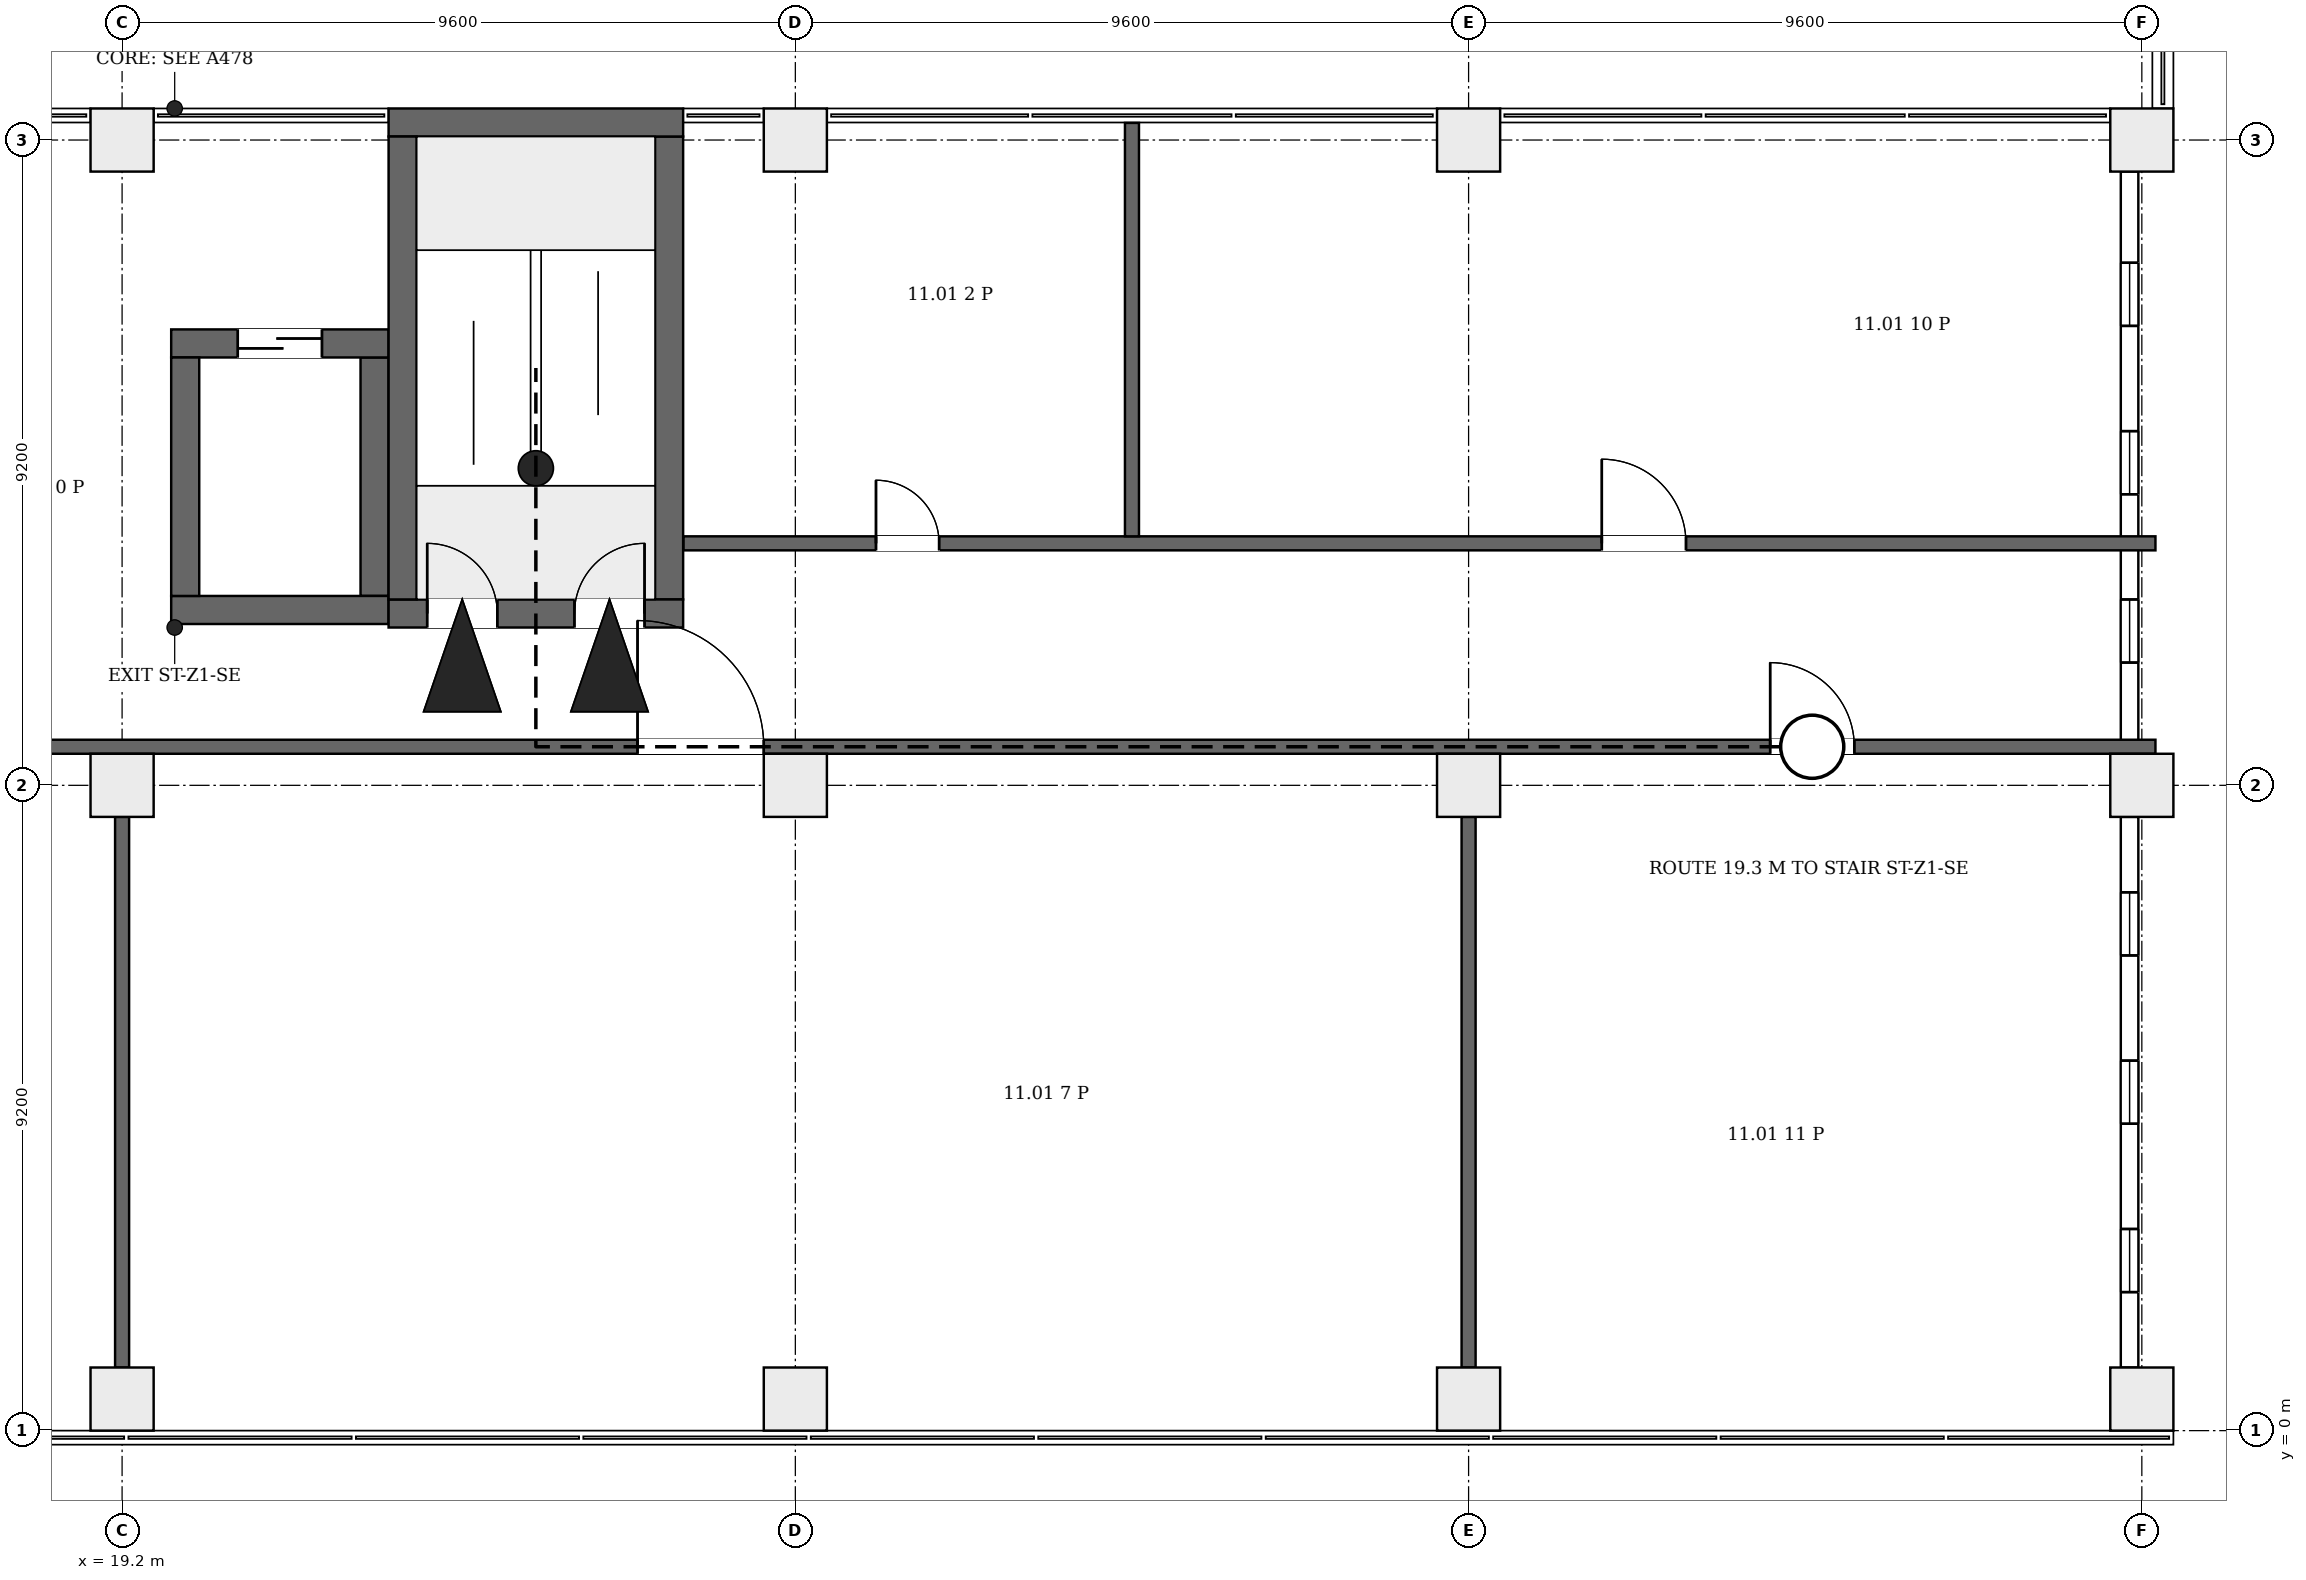
"""IFC4 building model, lengths in metres.
Left out: names, types, materials, properties, quantities, classifications, styles, units other than length and angle.
Written with IfcOpenShell. Run it as: python <this file> out.ifc"""

import sys

from ifc_helpers import new_model, si_unit, direction, frame, frame_2d, origin, origin_2d, place, context, subcontext, project, spatial, rectangle, extrude, element, fill, save


model = new_model("IFC4")
c1 = context("Model", 3, precision=1e-05, world=origin(), true_north=direction((0.0, 1.0)))
c2 = subcontext(c1, "Body", "Model", "MODEL_VIEW")
j1 = project(units=[si_unit("LENGTHUNIT", "METRE"), si_unit("PLANEANGLEUNIT", "RADIAN")], contexts=[c1])
p1 = place(None, origin())
s1 = spatial("IfcSite", under=j1, at=p1, CompositionType="ELEMENT")
p2 = place(p1, origin())
s2 = spatial("IfcBuilding", under=s1, at=p2, CompositionType="ELEMENT")
p3 = place(p2, frame((0.0, 0.0, 57.1)))
s3 = spatial("IfcBuildingStorey", under=s2, at=p3, CompositionType="ELEMENT", Elevation=57.1)
p4 = place(p3, frame((23.0, 11.65, 0.0), z_axis=(0.0, 0.0, 1.0), x_axis=(1.0, 0.0, 0.0)))
e1 = element("IfcWall", 1, at=p4, inside=s3, PredefinedType="SHEAR", context=c2, shape_type="SweptSolid", body=[
    extrude(rectangle(XDim=4.2, YDim=0.4, at=frame_2d((2.1, 0.0))), origin(), (0.0, 0.0, 1.0), 4.2),
])
p5 = place(p4, frame((0.55, 0.0, 0.0)))
e2 = element("IfcOpeningElement", 2, at=p5, cuts=e1, PredefinedType="OPENING", context=c2, shape_type="SweptSolid", body=[
    extrude(rectangle(XDim=1.0, YDim=2.1, at=frame_2d((0.5, 1.05))), frame((0.0, 0.21, 0.0), z_axis=(0.0, -1.0, 0.0), x_axis=(1.0, 0.0, 0.0)), (0.0, 0.0, 1.0), 0.42),
])
p6 = place(p4, frame((2.65, 0.0, 0.0)))
e3 = element("IfcOpeningElement", 3, at=p6, cuts=e1, PredefinedType="OPENING", context=c2, shape_type="SweptSolid", body=[
    extrude(rectangle(XDim=1.0, YDim=2.1, at=frame_2d((0.5, 1.05))), frame((0.0, 0.21, 0.0), z_axis=(0.0, -1.0, 0.0), x_axis=(1.0, 0.0, 0.0)), (0.0, 0.0, 1.0), 0.42),
])
p7 = place(p3, frame((23.0, 18.65, 0.0), z_axis=(0.0, 0.0, 1.0), x_axis=(1.0, 0.0, 0.0)))
e4 = element("IfcWall", 4, at=p7, inside=s3, PredefinedType="SHEAR", context=c2, shape_type="SweptSolid", body=[
    extrude(rectangle(XDim=4.2, YDim=0.4, at=frame_2d((2.1, 0.0))), origin(), (0.0, 0.0, 1.0), 4.2),
])
for number, where, z_axis, x_axis in (
    (5, (23.2, 11.85, 0.0), (0.0, 0.0, 1.0), (0.0, 1.0, 0.0)),
    (6, (27.0, 11.85, 0.0), (0.0, 0.0, 1.0), (0.0, 1.0, 0.0)),
):
    element("IfcWall", number, at=place(p3, frame(where, z_axis=z_axis, x_axis=x_axis)), inside=s3, PredefinedType="SHEAR", context=c2, shape_type="SweptSolid", body=[
        extrude(rectangle(XDim=6.6, YDim=0.4, at=frame_2d((3.3, 0.0))), origin(), (0.0, 0.0, 1.0), 4.2),
    ])
p8 = place(p3, frame((19.9, 11.7, 0.0), z_axis=(0.0, 0.0, 1.0), x_axis=(1.0, 0.0, 0.0)))
e7 = element("IfcWall", 7, at=p8, inside=s3, PredefinedType="SHEAR", context=c2, shape_type="SweptSolid", body=[
    extrude(rectangle(XDim=3.1, YDim=0.4, at=frame_2d((1.55, 0.0))), origin(), (0.0, 0.0, 1.0), 4.2),
])
p9 = place(p3, frame((19.9, 15.5, 0.0), z_axis=(0.0, 0.0, 1.0), x_axis=(1.0, 0.0, 0.0)))
e8 = element("IfcWall", 8, at=p9, inside=s3, PredefinedType="SHEAR", context=c2, shape_type="SweptSolid", body=[
    extrude(rectangle(XDim=3.1, YDim=0.4, at=frame_2d((1.55, 0.0))), origin(), (0.0, 0.0, 1.0), 4.2),
])
p10 = place(p9, frame((0.95, 0.0, 0.0)))
e9 = element("IfcOpeningElement", 9, at=p10, cuts=e8, PredefinedType="OPENING", context=c2, shape_type="SweptSolid", body=[
    extrude(rectangle(XDim=1.2, YDim=2.1, at=frame_2d((0.6, 1.05))), frame((0.0, 0.21, 0.0), z_axis=(0.0, -1.0, 0.0), x_axis=(1.0, 0.0, 0.0)), (0.0, 0.0, 1.0), 0.42),
])
for number, where, z_axis, x_axis in (
    (10, (20.1, 11.9, 0.0), (0.0, 0.0, 1.0), (0.0, 1.0, 0.0)),
    (11, (22.8, 11.9, 0.0), (0.0, 0.0, 1.0), (0.0, 1.0, 0.0)),
):
    element("IfcWall", number, at=place(p3, frame(where, z_axis=z_axis, x_axis=x_axis)), inside=s3, PredefinedType="SHEAR", context=c2, shape_type="SweptSolid", body=[
        extrude(rectangle(XDim=3.4, YDim=0.4, at=frame_2d((1.7, 0.0))), origin(), (0.0, 0.0, 1.0), 4.2),
    ])
for number, where, z_axis, x_axis in (
    (12, (19.2, 0.45, 0.0), (0.0, 0.0, 1.0), (1.0, 0.0, 0.0)),
    (13, (28.8, 0.45, 0.0), (0.0, 0.0, 1.0), (1.0, 0.0, 0.0)),
    (14, (38.4, 0.45, 0.0), (0.0, 0.0, 1.0), (1.0, 0.0, 0.0)),
    (15, (48.0, 0.45, 0.0), (0.0, 0.0, 1.0), (1.0, 0.0, 0.0)),
    (16, (19.2, 9.2, 0.0), (0.0, 0.0, 1.0), (1.0, 0.0, 0.0)),
    (17, (28.8, 9.2, 0.0), (0.0, 0.0, 1.0), (1.0, 0.0, 0.0)),
    (18, (38.4, 9.2, 0.0), (0.0, 0.0, 1.0), (1.0, 0.0, 0.0)),
    (19, (48.0, 9.2, 0.0), (0.0, 0.0, 1.0), (1.0, 0.0, 0.0)),
    (20, (19.2, 18.4, 0.0), (0.0, 0.0, 1.0), (1.0, 0.0, 0.0)),
    (21, (28.8, 18.4, 0.0), (0.0, 0.0, 1.0), (1.0, 0.0, 0.0)),
    (22, (38.4, 18.4, 0.0), (0.0, 0.0, 1.0), (1.0, 0.0, 0.0)),
    (23, (48.0, 18.4, 0.0), (0.0, 0.0, 1.0), (1.0, 0.0, 0.0)),
):
    element("IfcColumn", number, at=place(p3, frame(where, z_axis=z_axis, x_axis=x_axis)), inside=s3, PredefinedType="COLUMN", context=c2, shape_type="SweptSolid", body=[
        extrude(rectangle(XDim=0.9, YDim=0.9, at=origin_2d()), origin(), (0.0, 0.0, 1.0), 4.2),
    ])
p11 = place(p3, frame((47.825, 0.9, 0.0), z_axis=(0.0, 0.0, 1.0), x_axis=(0.0, 1.0, 0.0)))
e24 = element("IfcWall", 24, at=p11, inside=s3, PredefinedType="ELEMENTEDWALL", context=c2, shape_type="SweptSolid", body=[
    extrude(rectangle(XDim=7.85, YDim=0.25, at=frame_2d((3.925, 0.0))), origin(), (0.0, 0.0, 1.0), 3.3),
])
p12 = place(p11, frame((1.075, 0.0, 0.6)))
e25 = element("IfcOpeningElement", 25, at=p12, cuts=e24, PredefinedType="OPENING", context=c2, shape_type="SweptSolid", body=[
    extrude(rectangle(XDim=0.9, YDim=2.6, at=frame_2d((0.45, 1.3))), frame((0.0, 0.135, 0.0), z_axis=(0.0, -1.0, 0.0), x_axis=(1.0, 0.0, 0.0)), (0.0, 0.0, 1.0), 0.27),
])
p13 = place(p11, frame((3.475, 0.0, 0.6)))
e26 = element("IfcOpeningElement", 26, at=p13, cuts=e24, PredefinedType="OPENING", context=c2, shape_type="SweptSolid", body=[
    extrude(rectangle(XDim=0.9, YDim=2.6, at=frame_2d((0.45, 1.3))), frame((0.0, 0.135, 0.0), z_axis=(0.0, -1.0, 0.0), x_axis=(1.0, 0.0, 0.0)), (0.0, 0.0, 1.0), 0.27),
])
p14 = place(p11, frame((5.875, 0.0, 0.6)))
e27 = element("IfcOpeningElement", 27, at=p14, cuts=e24, PredefinedType="OPENING", context=c2, shape_type="SweptSolid", body=[
    extrude(rectangle(XDim=0.9, YDim=2.6, at=frame_2d((0.45, 1.3))), frame((0.0, 0.135, 0.0), z_axis=(0.0, -1.0, 0.0), x_axis=(1.0, 0.0, 0.0)), (0.0, 0.0, 1.0), 0.27),
])
p15 = place(p3, frame((47.825, 9.65, 0.0), z_axis=(0.0, 0.0, 1.0), x_axis=(0.0, 1.0, 0.0)))
e28 = element("IfcWall", 28, at=p15, inside=s3, PredefinedType="ELEMENTEDWALL", context=c2, shape_type="SweptSolid", body=[
    extrude(rectangle(XDim=8.3, YDim=0.25, at=frame_2d((4.15, 0.0))), origin(), (0.0, 0.0, 1.0), 3.3),
])
p16 = place(p15, frame((1.3, 0.0, 0.6)))
e29 = element("IfcOpeningElement", 29, at=p16, cuts=e28, PredefinedType="OPENING", context=c2, shape_type="SweptSolid", body=[
    extrude(rectangle(XDim=0.9, YDim=2.6, at=frame_2d((0.45, 1.3))), frame((0.0, 0.135, 0.0), z_axis=(0.0, -1.0, 0.0), x_axis=(1.0, 0.0, 0.0)), (0.0, 0.0, 1.0), 0.27),
])
p17 = place(p15, frame((3.7, 0.0, 0.6)))
e30 = element("IfcOpeningElement", 30, at=p17, cuts=e28, PredefinedType="OPENING", context=c2, shape_type="SweptSolid", body=[
    extrude(rectangle(XDim=0.9, YDim=2.6, at=frame_2d((0.45, 1.3))), frame((0.0, 0.135, 0.0), z_axis=(0.0, -1.0, 0.0), x_axis=(1.0, 0.0, 0.0)), (0.0, 0.0, 1.0), 0.27),
])
p18 = place(p15, frame((6.1, 0.0, 0.6)))
e31 = element("IfcOpeningElement", 31, at=p18, cuts=e28, PredefinedType="OPENING", context=c2, shape_type="SweptSolid", body=[
    extrude(rectangle(XDim=0.9, YDim=2.6, at=frame_2d((0.45, 1.3))), frame((0.0, 0.135, 0.0), z_axis=(0.0, -1.0, 0.0), x_axis=(1.0, 0.0, 0.0)), (0.0, 0.0, 1.0), 0.27),
])
p19 = place(p3, frame((4.3, 9.75, 0.0), z_axis=(0.0, 0.0, 1.0), x_axis=(1.0, 0.0, 0.0)))
e32 = element("IfcWall", 32, at=p19, inside=s3, PredefinedType="PARTITIONING", context=c2, shape_type="SweptSolid", body=[
    extrude(rectangle(XDim=43.894, YDim=0.2, at=frame_2d((21.947, 0.0))), origin(), (0.0, 0.0, 1.0), 3.9),
])
p20 = place(p19, frame((6.6, 0.0, 0.0)))
e33 = element("IfcOpeningElement", 33, at=p20, cuts=e32, PredefinedType="OPENING", context=c2, shape_type="SweptSolid", body=[
    extrude(rectangle(XDim=1.8, YDim=2.1, at=frame_2d((0.9, 1.05))), frame((0.0, 0.11, 0.0), z_axis=(0.0, -1.0, 0.0), x_axis=(1.0, 0.0, 0.0)), (0.0, 0.0, 1.0), 0.22),
])
p21 = place(p19, frame((22.25, 0.0, 0.0)))
e34 = element("IfcOpeningElement", 34, at=p21, cuts=e32, PredefinedType="OPENING", context=c2, shape_type="SweptSolid", body=[
    extrude(rectangle(XDim=1.8, YDim=2.1, at=frame_2d((0.9, 1.05))), frame((0.0, 0.11, 0.0), z_axis=(0.0, -1.0, 0.0), x_axis=(1.0, 0.0, 0.0)), (0.0, 0.0, 1.0), 0.22),
])
p22 = place(p19, frame((38.4, 0.0, 0.0)))
e35 = element("IfcOpeningElement", 35, at=p22, cuts=e32, PredefinedType="OPENING", context=c2, shape_type="SweptSolid", body=[
    extrude(rectangle(XDim=1.2, YDim=2.1, at=frame_2d((0.6, 1.05))), frame((0.0, 0.11, 0.0), z_axis=(0.0, -1.0, 0.0), x_axis=(1.0, 0.0, 0.0)), (0.0, 0.0, 1.0), 0.22),
])
p23 = place(p3, frame((19.2, 0.9, 0.0), z_axis=(0.0, 0.0, 1.0), x_axis=(0.0, 1.0, 0.0)))
e36 = element("IfcWall", 36, at=p23, inside=s3, PredefinedType="PARTITIONING", context=c2, shape_type="SweptSolid", body=[
    extrude(rectangle(XDim=7.85, YDim=0.2, at=frame_2d((3.925, 0.0))), origin(), (0.0, 0.0, 1.0), 3.9),
])
p24 = place(p3, frame((27.206, 12.65, 0.0), z_axis=(0.0, 0.0, 1.0), x_axis=(1.0, 0.0, 0.0)))
e37 = element("IfcWall", 37, at=p24, inside=s3, PredefinedType="PARTITIONING", context=c2, shape_type="SweptSolid", body=[
    extrude(rectangle(XDim=20.988, YDim=0.2, at=frame_2d((10.494, 0.0))), origin(), (0.0, 0.0, 1.0), 3.9),
])
p25 = place(p24, frame((2.744, 0.0, 0.0)))
e38 = element("IfcOpeningElement", 38, at=p25, cuts=e37, PredefinedType="OPENING", context=c2, shape_type="SweptSolid", body=[
    extrude(rectangle(XDim=0.9, YDim=2.1, at=frame_2d((0.45, 1.05))), frame((0.0, 0.11, 0.0), z_axis=(0.0, -1.0, 0.0), x_axis=(1.0, 0.0, 0.0)), (0.0, 0.0, 1.0), 0.22),
])
p26 = place(p24, frame((13.094, 0.0, 0.0)))
e39 = element("IfcOpeningElement", 39, at=p26, cuts=e37, PredefinedType="OPENING", context=c2, shape_type="SweptSolid", body=[
    extrude(rectangle(XDim=1.2, YDim=2.1, at=frame_2d((0.6, 1.05))), frame((0.0, 0.11, 0.0), z_axis=(0.0, -1.0, 0.0), x_axis=(1.0, 0.0, 0.0)), (0.0, 0.0, 1.0), 0.22),
])
p27 = place(p3, frame((33.6, 12.75, 0.0), z_axis=(0.0, 0.0, 1.0), x_axis=(0.0, 1.0, 0.0)))
e40 = element("IfcWall", 40, at=p27, inside=s3, PredefinedType="PARTITIONING", context=c2, shape_type="SweptSolid", body=[
    extrude(rectangle(XDim=5.894, YDim=0.2, at=frame_2d((2.947, 0.0))), origin(), (0.0, 0.0, 1.0), 3.9),
])
p28 = place(p3, frame((38.4, 0.9, 0.0), z_axis=(0.0, 0.0, 1.0), x_axis=(0.0, 1.0, 0.0)))
e41 = element("IfcWall", 41, at=p28, inside=s3, PredefinedType="PARTITIONING", context=c2, shape_type="SweptSolid", body=[
    extrude(rectangle(XDim=7.85, YDim=0.2, at=frame_2d((3.925, 0.0))), origin(), (0.0, 0.0, 1.0), 3.9),
])
p29 = place(p12, origin())
e42 = element("IfcWindow", 42, at=p29, inside=s3, PartitioningType="SINGLE_PANEL", PredefinedType="WINDOW", context=c2, shape_type="SweptSolid", body=[
    extrude(rectangle(XDim=0.9, YDim=2.6, at=frame_2d((0.45, 1.3))), frame((0.0, 0.03, 0.0), z_axis=(0.0, -1.0, 0.0), x_axis=(1.0, 0.0, 0.0)), (0.0, 0.0, 1.0), 0.06),
])
fill(e25, e42)
p30 = place(p13, origin())
e43 = element("IfcWindow", 43, at=p30, inside=s3, PartitioningType="SINGLE_PANEL", PredefinedType="WINDOW", context=c2, shape_type="SweptSolid", body=[
    extrude(rectangle(XDim=0.9, YDim=2.6, at=frame_2d((0.45, 1.3))), frame((0.0, 0.03, 0.0), z_axis=(0.0, -1.0, 0.0), x_axis=(1.0, 0.0, 0.0)), (0.0, 0.0, 1.0), 0.06),
])
fill(e26, e43)
p31 = place(p14, origin())
e44 = element("IfcWindow", 44, at=p31, inside=s3, PartitioningType="SINGLE_PANEL", PredefinedType="WINDOW", context=c2, shape_type="SweptSolid", body=[
    extrude(rectangle(XDim=0.9, YDim=2.6, at=frame_2d((0.45, 1.3))), frame((0.0, 0.03, 0.0), z_axis=(0.0, -1.0, 0.0), x_axis=(1.0, 0.0, 0.0)), (0.0, 0.0, 1.0), 0.06),
])
fill(e27, e44)
p32 = place(p16, origin())
e45 = element("IfcWindow", 45, at=p32, inside=s3, PartitioningType="SINGLE_PANEL", PredefinedType="WINDOW", context=c2, shape_type="SweptSolid", body=[
    extrude(rectangle(XDim=0.9, YDim=2.6, at=frame_2d((0.45, 1.3))), frame((0.0, 0.03, 0.0), z_axis=(0.0, -1.0, 0.0), x_axis=(1.0, 0.0, 0.0)), (0.0, 0.0, 1.0), 0.06),
])
fill(e29, e45)
p33 = place(p17, origin())
e46 = element("IfcWindow", 46, at=p33, inside=s3, PartitioningType="SINGLE_PANEL", PredefinedType="WINDOW", context=c2, shape_type="SweptSolid", body=[
    extrude(rectangle(XDim=0.9, YDim=2.6, at=frame_2d((0.45, 1.3))), frame((0.0, 0.03, 0.0), z_axis=(0.0, -1.0, 0.0), x_axis=(1.0, 0.0, 0.0)), (0.0, 0.0, 1.0), 0.06),
])
fill(e30, e46)
p34 = place(p18, origin())
e47 = element("IfcWindow", 47, at=p34, inside=s3, PartitioningType="SINGLE_PANEL", PredefinedType="WINDOW", context=c2, shape_type="SweptSolid", body=[
    extrude(rectangle(XDim=0.9, YDim=2.6, at=frame_2d((0.45, 1.3))), frame((0.0, 0.03, 0.0), z_axis=(0.0, -1.0, 0.0), x_axis=(1.0, 0.0, 0.0)), (0.0, 0.0, 1.0), 0.06),
])
fill(e31, e47)
p35 = place(p5, origin())
e48 = element("IfcDoor", 48, at=p35, inside=s3, OperationType="SINGLE_SWING_RIGHT", PredefinedType="DOOR", context=c2, shape_type="SweptSolid", body=[
    extrude(rectangle(XDim=1.0, YDim=2.1, at=frame_2d((0.5, 1.05))), frame((0.0, 0.025, 0.0), z_axis=(0.0, -1.0, 0.0), x_axis=(1.0, 0.0, 0.0)), (0.0, 0.0, 1.0), 0.05),
])
fill(e2, e48)
p36 = place(p6, origin())
e49 = element("IfcDoor", 49, at=p36, inside=s3, OperationType="SINGLE_SWING_LEFT", PredefinedType="DOOR", context=c2, shape_type="SweptSolid", body=[
    extrude(rectangle(XDim=1.0, YDim=2.1, at=frame_2d((0.5, 1.05))), frame((0.0, 0.025, 0.0), z_axis=(0.0, -1.0, 0.0), x_axis=(1.0, 0.0, 0.0)), (0.0, 0.0, 1.0), 0.05),
])
fill(e3, e49)
p37 = place(p10, origin())
e50 = element("IfcDoor", 50, at=p37, inside=s3, OperationType="DOUBLE_DOOR_SLIDING", PredefinedType="DOOR", context=c2, shape_type="SweptSolid", body=[
    extrude(rectangle(XDim=1.2, YDim=2.1, at=frame_2d((0.6, 1.05))), frame((0.0, 0.025, 0.0), z_axis=(0.0, -1.0, 0.0), x_axis=(1.0, 0.0, 0.0)), (0.0, 0.0, 1.0), 0.05),
])
fill(e9, e50)
p38 = place(p21, origin())
e51 = element("IfcDoor", 51, at=p38, inside=s3, OperationType="DOUBLE_DOOR_SINGLE_SWING", PredefinedType="DOOR", context=c2, shape_type="SweptSolid", body=[
    extrude(rectangle(XDim=1.8, YDim=2.1, at=frame_2d((0.9, 1.05))), frame((0.0, 0.025, 0.0), z_axis=(0.0, -1.0, 0.0), x_axis=(1.0, 0.0, 0.0)), (0.0, 0.0, 1.0), 0.05),
])
fill(e34, e51)
p39 = place(p22, origin())
e52 = element("IfcDoor", 52, at=p39, inside=s3, OperationType="SINGLE_SWING_LEFT", PredefinedType="DOOR", context=c2, shape_type="SweptSolid", body=[
    extrude(rectangle(XDim=1.2, YDim=2.1, at=frame_2d((0.6, 1.05))), frame((0.0, 0.025, 0.0), z_axis=(0.0, -1.0, 0.0), x_axis=(1.0, 0.0, 0.0)), (0.0, 0.0, 1.0), 0.05),
])
fill(e35, e52)
p40 = place(p25, origin())
e53 = element("IfcDoor", 53, at=p40, inside=s3, OperationType="SINGLE_SWING_LEFT", PredefinedType="DOOR", context=c2, shape_type="SweptSolid", body=[
    extrude(rectangle(XDim=0.9, YDim=2.1, at=frame_2d((0.45, 1.05))), frame((0.0, 0.025, 0.0), z_axis=(0.0, -1.0, 0.0), x_axis=(1.0, 0.0, 0.0)), (0.0, 0.0, 1.0), 0.05),
])
fill(e38, e53)
p41 = place(p26, origin())
e54 = element("IfcDoor", 54, at=p41, inside=s3, OperationType="SINGLE_SWING_RIGHT", PredefinedType="DOOR", context=c2, shape_type="SweptSolid", body=[
    extrude(rectangle(XDim=1.2, YDim=2.1, at=frame_2d((0.6, 1.05))), frame((0.0, 0.025, 0.0), z_axis=(0.0, -1.0, 0.0), x_axis=(1.0, 0.0, 0.0)), (0.0, 0.0, 1.0), 0.05),
])
fill(e39, e54)
save(model, sys.argv[1])
